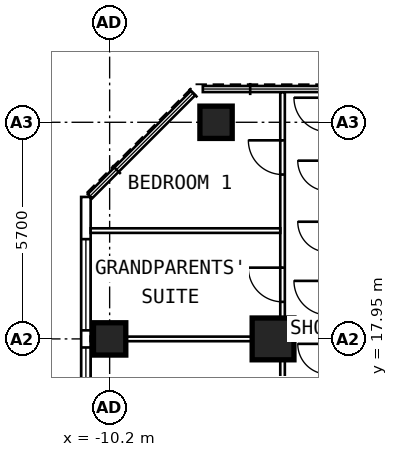
"""IFC4 building model, lengths in metres.
Left out: names, types, materials, properties, quantities, classifications, styles, units other than length and angle.
Written with IfcOpenShell. Run it as: python <this file> out.ifc"""

import sys

from ifc_helpers import new_model, si_unit, direction, frame, frame_2d, origin, origin_2d, place, context, subcontext, project, spatial, rectangle, extrude, element, fill, save


model = new_model("IFC4")
c1 = context("Model", 3, precision=1e-05, world=origin(), true_north=direction((0.0, 1.0)))
c2 = subcontext(c1, "Body", "Model", "MODEL_VIEW")
j1 = project(units=[si_unit("LENGTHUNIT", "METRE"), si_unit("PLANEANGLEUNIT", "RADIAN")], contexts=[c1])
p1 = place(None, origin())
s1 = spatial("IfcSite", under=j1, at=p1, CompositionType="ELEMENT")
p2 = place(p1, origin())
s2 = spatial("IfcBuilding", under=s1, at=p2, CompositionType="ELEMENT")
p3 = place(p2, frame((0.0, 0.0, 256.8)))
s3 = spatial("IfcBuildingStorey", under=s2, at=p3, CompositionType="ELEMENT", Elevation=256.8)
for number, where, z_axis, x_axis in (
    (1, (-10.2, 17.95, 0.0), (0.0, 0.0, 1.0), (0.0, 1.0, 0.0)),
    (2, (-7.4, 23.65, 0.0), (0.0, 0.0, 1.0), (0.0, 1.0, 0.0)),
):
    element("IfcColumn", number, at=place(p3, frame(where, z_axis=z_axis, x_axis=x_axis)), inside=s3, PredefinedType="COLUMN", context=c2, shape_type="SweptSolid", body=[
        extrude(rectangle(XDim=0.85, YDim=0.85, at=origin_2d()), origin(), (0.0, 0.0, 1.0), 3.6),
    ])
p4 = place(p3, frame((-5.9, 17.95, 0.0), z_axis=(0.0, 0.0, 1.0), x_axis=(0.0, 1.0, 0.0)))
e3 = element("IfcColumn", 3, at=p4, inside=s3, PredefinedType="COLUMN", context=c2, shape_type="SweptSolid", body=[
    extrude(rectangle(XDim=1.1, YDim=1.1, at=origin_2d()), origin(), (0.0, 0.0, 1.0), 3.6),
])
p5 = place(p3, frame((-10.825, 6.148, 0.0), z_axis=(0.0, 0.0, 1.0), x_axis=(0.0, 1.0, 0.0)))
e4 = element("IfcWall", 4, at=p5, inside=s3, PredefinedType="SOLIDWALL", context=c2, shape_type="SweptSolid", body=[
    extrude(rectangle(XDim=15.537, YDim=0.25, at=frame_2d((7.769, 0.0))), origin(), (0.0, 0.0, 1.0), 3.3),
])
p6 = place(p5, frame((0.627, 0.0, 0.8)))
e5 = element("IfcOpeningElement", 5, at=p6, cuts=e4, PredefinedType="OPENING", context=c2, shape_type="SweptSolid", body=[
    extrude(rectangle(XDim=2.4, YDim=1.8, at=frame_2d((1.2, 0.9))), frame((0.0, 0.137, 0.0), z_axis=(0.0, -1.0, 0.0), x_axis=(1.0, 0.0, 0.0)), (0.0, 0.0, 1.0), 0.274),
])
p7 = place(p5, frame((3.477, 0.0, 0.8)))
e6 = element("IfcOpeningElement", 6, at=p7, cuts=e4, PredefinedType="OPENING", context=c2, shape_type="SweptSolid", body=[
    extrude(rectangle(XDim=2.4, YDim=1.8, at=frame_2d((1.2, 0.9))), frame((0.0, 0.137, 0.0), z_axis=(0.0, -1.0, 0.0), x_axis=(1.0, 0.0, 0.0)), (0.0, 0.0, 1.0), 0.274),
])
p8 = place(p5, frame((6.327, 0.0, 0.8)))
e7 = element("IfcOpeningElement", 7, at=p8, cuts=e4, PredefinedType="OPENING", context=c2, shape_type="SweptSolid", body=[
    extrude(rectangle(XDim=2.4, YDim=1.8, at=frame_2d((1.2, 0.9))), frame((0.0, 0.137, 0.0), z_axis=(0.0, -1.0, 0.0), x_axis=(1.0, 0.0, 0.0)), (0.0, 0.0, 1.0), 0.274),
])
p9 = place(p5, frame((9.177, 0.0, 0.8)))
e8 = element("IfcOpeningElement", 8, at=p9, cuts=e4, PredefinedType="OPENING", context=c2, shape_type="SweptSolid", body=[
    extrude(rectangle(XDim=2.4, YDim=1.8, at=frame_2d((1.2, 0.9))), frame((0.0, 0.137, 0.0), z_axis=(0.0, -1.0, 0.0), x_axis=(1.0, 0.0, 0.0)), (0.0, 0.0, 1.0), 0.274),
])
p10 = place(p5, frame((12.027, 0.0, 0.8)))
e9 = element("IfcOpeningElement", 9, at=p10, cuts=e4, PredefinedType="OPENING", context=c2, shape_type="SweptSolid", body=[
    extrude(rectangle(XDim=2.4, YDim=1.8, at=frame_2d((1.2, 0.9))), frame((0.0, 0.137, 0.0), z_axis=(0.0, -1.0, 0.0), x_axis=(1.0, 0.0, 0.0)), (0.0, 0.0, 1.0), 0.274),
])
p11 = place(p3, frame((-5.65, 9.6, 0.0), z_axis=(0.0, 0.0, 1.0), x_axis=(0.0, 1.0, 0.0)))
e10 = element("IfcWall", 10, at=p11, inside=s3, PredefinedType="PARTITIONING", context=c2, shape_type="SweptSolid", body=[
    extrude(rectangle(XDim=14.845, YDim=0.12, at=frame_2d((7.422, 0.0))), origin(), (0.0, 0.0, 1.0), 3.3),
])
p12 = place(p11, frame((5.05, 0.0, 0.0)))
e11 = element("IfcOpeningElement", 11, at=p12, cuts=e10, PredefinedType="OPENING", context=c2, shape_type="SweptSolid", body=[
    extrude(rectangle(XDim=0.9, YDim=2.1, at=frame_2d((0.45, 1.05))), frame((0.0, 0.072, 0.0), z_axis=(0.0, -1.0, 0.0), x_axis=(1.0, 0.0, 0.0)), (0.0, 0.0, 1.0), 0.144),
])
p13 = place(p11, frame((9.325, 0.0, 0.0)))
e12 = element("IfcOpeningElement", 12, at=p13, cuts=e10, PredefinedType="OPENING", context=c2, shape_type="SweptSolid", body=[
    extrude(rectangle(XDim=0.9, YDim=2.1, at=frame_2d((0.45, 1.05))), frame((0.0, 0.072, 0.0), z_axis=(0.0, -1.0, 0.0), x_axis=(1.0, 0.0, 0.0)), (0.0, 0.0, 1.0), 0.144),
])
p14 = place(p11, frame((12.675, 0.0, 0.0)))
e13 = element("IfcOpeningElement", 13, at=p14, cuts=e10, PredefinedType="OPENING", context=c2, shape_type="SweptSolid", body=[
    extrude(rectangle(XDim=0.9, YDim=2.1, at=frame_2d((0.45, 1.05))), frame((0.0, 0.072, 0.0), z_axis=(0.0, -1.0, 0.0), x_axis=(1.0, 0.0, 0.0)), (0.0, 0.0, 1.0), 0.144),
])
for number, where, z_axis, x_axis in (
    (14, (-5.71, 17.95, 0.0), (0.0, 0.0, 1.0), (-1.0, 0.0, 0.0)),
    (15, (-5.71, 20.8, 0.0), (0.0, 0.0, 1.0), (-1.0, 0.0, 0.0)),
):
    element("IfcWall", number, at=place(p3, frame(where, z_axis=z_axis, x_axis=x_axis)), inside=s3, PredefinedType="PARTITIONING", context=c2, shape_type="SweptSolid", body=[
        extrude(rectangle(XDim=4.99, YDim=0.12, at=frame_2d((2.495, 0.0))), origin(), (0.0, 0.0, 1.0), 3.3),
    ])
p15 = place(p9, origin())
e16 = element("IfcWindow", 16, at=p15, inside=s3, PartitioningType="SINGLE_PANEL", PredefinedType="WINDOW", context=c2, shape_type="SweptSolid", body=[
    extrude(rectangle(XDim=2.4, YDim=1.8, at=frame_2d((1.2, 0.9))), frame((0.0, 0.03, 0.0), z_axis=(0.0, -1.0, 0.0), x_axis=(1.0, 0.0, 0.0)), (0.0, 0.0, 1.0), 0.06),
])
fill(e8, e16)
p16 = place(p10, origin())
e17 = element("IfcWindow", 17, at=p16, inside=s3, PartitioningType="SINGLE_PANEL", PredefinedType="WINDOW", context=c2, shape_type="SweptSolid", body=[
    extrude(rectangle(XDim=2.4, YDim=1.8, at=frame_2d((1.2, 0.9))), frame((0.0, 0.03, 0.0), z_axis=(0.0, -1.0, 0.0), x_axis=(1.0, 0.0, 0.0)), (0.0, 0.0, 1.0), 0.06),
])
fill(e9, e17)
p17 = place(p13, origin())
e18 = element("IfcDoor", 18, at=p17, inside=s3, OperationType="SINGLE_SWING_RIGHT", PredefinedType="DOOR", context=c2, shape_type="SweptSolid", body=[
    extrude(rectangle(XDim=0.9, YDim=2.1, at=frame_2d((0.45, 1.05))), frame((0.0, 0.025, 0.0), z_axis=(0.0, -1.0, 0.0), x_axis=(1.0, 0.0, 0.0)), (0.0, 0.0, 1.0), 0.05),
])
fill(e12, e18)
p18 = place(p14, origin())
e19 = element("IfcDoor", 19, at=p18, inside=s3, OperationType="SINGLE_SWING_RIGHT", PredefinedType="DOOR", context=c2, shape_type="SweptSolid", body=[
    extrude(rectangle(XDim=0.9, YDim=2.1, at=frame_2d((0.45, 1.05))), frame((0.0, 0.025, 0.0), z_axis=(0.0, -1.0, 0.0), x_axis=(1.0, 0.0, 0.0)), (0.0, 0.0, 1.0), 0.05),
])
fill(e13, e19)
save(model, sys.argv[1])
